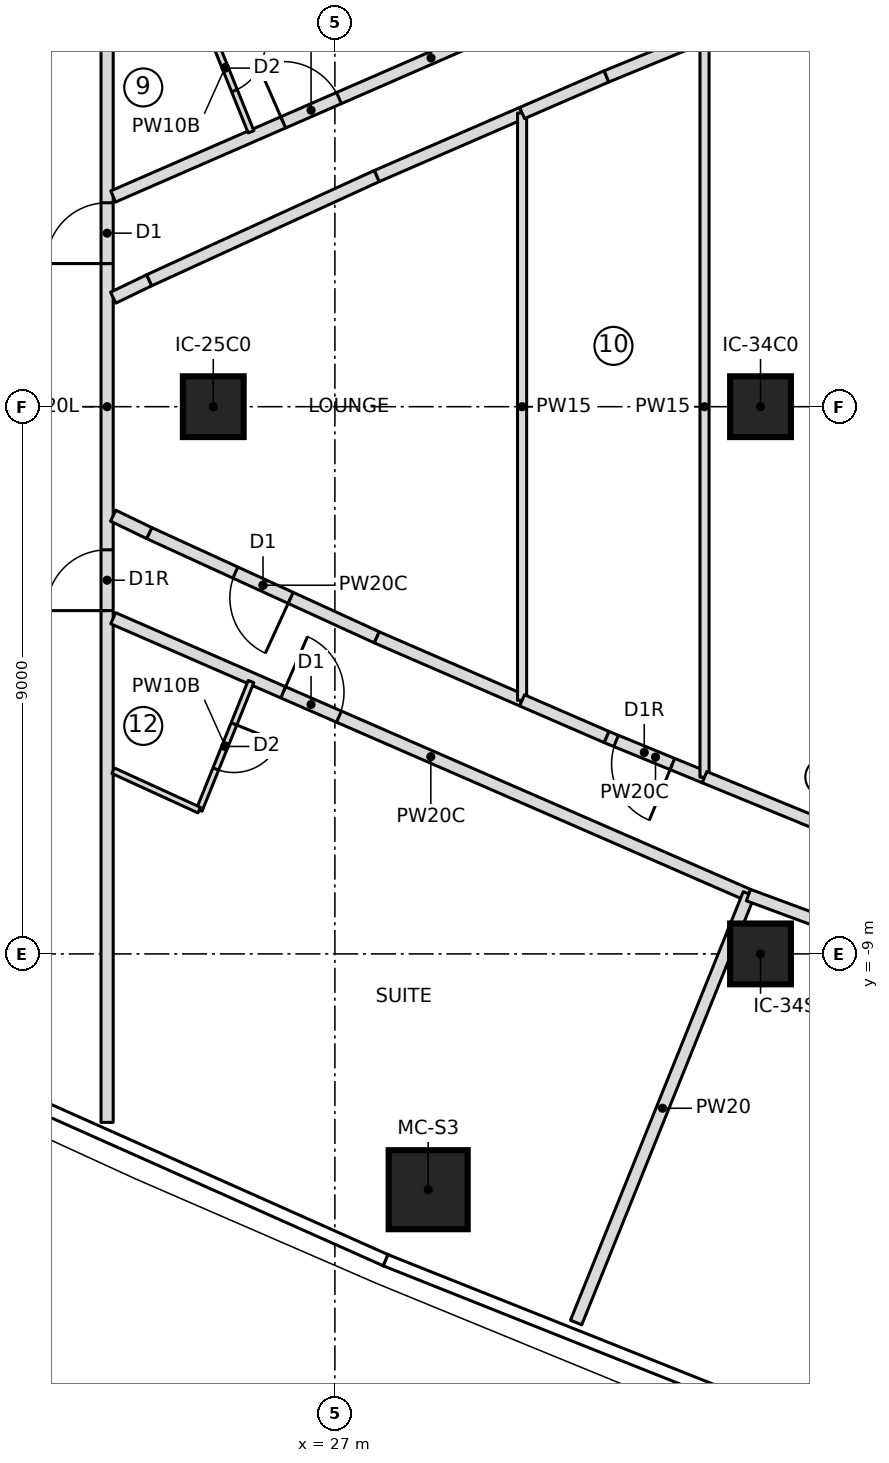
"""IFC4 building model, lengths in metres.
Left out: names, types, materials, properties, quantities, classifications, styles, units other than length and angle.
Written with IfcOpenShell. Run it as: python <this file> out.ifc"""

import sys

from ifc_helpers import new_model, si_unit, direction, frame, frame_2d, origin, origin_2d, place, context, subcontext, project, spatial, rectangle, extrude, element, fill, save


model = new_model("IFC4")
c1 = context("Model", 3, precision=1e-05, world=origin(), true_north=direction((0.0, 1.0)))
c2 = subcontext(c1, "Body", "Model", "MODEL_VIEW")
j1 = project(units=[si_unit("LENGTHUNIT", "METRE"), si_unit("PLANEANGLEUNIT", "RADIAN")], contexts=[c1])
p1 = place(None, origin())
s1 = spatial("IfcSite", under=j1, at=p1, CompositionType="ELEMENT")
p2 = place(p1, origin())
s2 = spatial("IfcBuilding", under=s1, at=p2, CompositionType="ELEMENT")
p3 = place(p2, frame((0.0, 0.0, 186.15)))
s3 = spatial("IfcBuildingStorey", under=s2, at=p3, CompositionType="ELEMENT", Elevation=186.15)
p4 = place(p3, frame((28.534, -12.878, 0.0), z_axis=(0.0, 0.0, 1.0), x_axis=(1.0, 0.0, 0.0)))
e1 = element("IfcColumn", 1, at=p4, inside=s3, PredefinedType="COLUMN", context=c2, shape_type="SweptSolid", body=[
    extrude(rectangle(XDim=1.3, YDim=1.3, at=origin_2d()), origin(), (0.0, 0.0, 1.0), 3.55),
])
for number, where, z_axis, x_axis in (
    (2, (25.0, 0.0, 0.0), (0.0, 0.0, 1.0), (1.0, 0.0, 0.0)),
    (3, (34.0, -9.0, 0.0), (0.0, 0.0, 1.0), (1.0, 0.0, 0.0)),
    (4, (34.0, 0.0, 0.0), (0.0, 0.0, 1.0), (1.0, 0.0, 0.0)),
):
    element("IfcColumn", number, at=place(p3, frame(where, z_axis=z_axis, x_axis=x_axis)), inside=s3, PredefinedType="COLUMN", context=c2, shape_type="SweptSolid", body=[
        extrude(rectangle(XDim=1.0, YDim=1.0, at=origin_2d()), origin(), (0.0, 0.0, 1.0), 3.55),
    ])
p5 = place(p3, frame((23.254, -11.771, 0.0), z_axis=(0.0, 0.0, 1.0), x_axis=(0.0, 1.0, 0.0)))
e5 = element("IfcWall", 5, at=p5, inside=s3, PredefinedType="PARTITIONING", context=c2, shape_type="SweptSolid", body=[
    extrude(rectangle(XDim=23.542, YDim=0.2, at=frame_2d((11.771, 0.0))), origin(), (0.0, 0.0, 1.0), 3.25),
])
p6 = place(p5, frame((14.125, 0.0, 0.0)))
e6 = element("IfcOpeningElement", 6, at=p6, cuts=e5, PredefinedType="OPENING", context=c2, shape_type="SweptSolid", body=[
    extrude(rectangle(XDim=1.0, YDim=2.1, at=frame_2d((0.5, 1.05))), frame((0.0, 0.11, 0.0), z_axis=(0.0, -1.0, 0.0), x_axis=(1.0, 0.0, 0.0)), (0.0, 0.0, 1.0), 0.22),
])
p7 = place(p5, frame((8.417, 0.0, 0.0)))
e7 = element("IfcOpeningElement", 7, at=p7, cuts=e5, PredefinedType="OPENING", context=c2, shape_type="SweptSolid", body=[
    extrude(rectangle(XDim=1.0, YDim=2.1, at=frame_2d((0.5, 1.05))), frame((0.0, 0.11, 0.0), z_axis=(0.0, -1.0, 0.0), x_axis=(1.0, 0.0, 0.0)), (0.0, 0.0, 1.0), 0.22),
])
p8 = place(p3, frame((23.354, 3.458, 0.0), z_axis=(0.0, 0.0, 1.0), x_axis=(0.916719487908, 0.399531451189, 0.0)))
e8 = element("IfcWall", 8, at=p8, inside=s3, PredefinedType="PARTITIONING", context=c2, shape_type="SweptSolid", body=[
    extrude(rectangle(XDim=11.404, YDim=0.2, at=frame_2d((5.702, 0.0))), origin(), (0.0, 0.0, 1.0), 3.25),
])
p9 = place(p8, frame((3.05, 0.0, 0.0)))
e9 = element("IfcOpeningElement", 9, at=p9, cuts=e8, PredefinedType="OPENING", context=c2, shape_type="SweptSolid", body=[
    extrude(rectangle(XDim=1.0, YDim=2.1, at=frame_2d((0.5, 1.05))), frame((0.0, 0.11, 0.0), z_axis=(0.0, -1.0, 0.0), x_axis=(1.0, 0.0, 0.0)), (0.0, 0.0, 1.0), 0.22),
])
p10 = place(p3, frame((24.769, 6.635, 0.0), z_axis=(0.0, 0.0, 1.0), x_axis=(0.373956446544, -0.927446265877, 0.0)))
e10 = element("IfcWall", 10, at=p10, inside=s3, PredefinedType="PARTITIONING", context=c2, shape_type="SweptSolid", body=[
    extrude(rectangle(XDim=2.279, YDim=0.1, at=frame_2d((1.14, 0.0))), origin(), (0.0, 0.0, 1.0), 3.25),
])
p11 = place(p10, frame((0.75, 0.0, 0.0)))
e11 = element("IfcOpeningElement", 11, at=p11, cuts=e10, PredefinedType="OPENING", context=c2, shape_type="SweptSolid", body=[
    extrude(rectangle(XDim=0.8, YDim=2.1, at=frame_2d((0.4, 1.05))), frame((0.0, 0.06, 0.0), z_axis=(0.0, -1.0, 0.0), x_axis=(1.0, 0.0, 0.0)), (0.0, 0.0, 1.0), 0.12),
])
p12 = place(p3, frame((23.354, -3.479, 0.0), z_axis=(0.0, 0.0, 1.0), x_axis=(0.916726746983, -0.399514794926, 0.0)))
e12 = element("IfcWall", 12, at=p12, inside=s3, PredefinedType="PARTITIONING", context=c2, shape_type="SweptSolid", body=[
    extrude(rectangle(XDim=11.396, YDim=0.2, at=frame_2d((5.698, 0.0))), origin(), (0.0, 0.0, 1.0), 3.25),
])
p13 = place(p12, frame((3.05, 0.0, 0.0)))
e13 = element("IfcOpeningElement", 13, at=p13, cuts=e12, PredefinedType="OPENING", context=c2, shape_type="SweptSolid", body=[
    extrude(rectangle(XDim=1.0, YDim=2.1, at=frame_2d((0.5, 1.05))), frame((0.0, 0.11, 0.0), z_axis=(0.0, -1.0, 0.0), x_axis=(1.0, 0.0, 0.0)), (0.0, 0.0, 1.0), 0.22),
])
p14 = place(p3, frame((25.621, -4.521, 0.0), z_axis=(0.0, 0.0, 1.0), x_axis=(-0.373956446544, -0.927446265877, 0.0)))
e14 = element("IfcWall", 14, at=p14, inside=s3, PredefinedType="PARTITIONING", context=c2, shape_type="SweptSolid", body=[
    extrude(rectangle(XDim=2.279, YDim=0.1, at=frame_2d((1.14, 0.0))), origin(), (0.0, 0.0, 1.0), 3.25),
])
p15 = place(p14, frame((0.75, 0.0, 0.0)))
e15 = element("IfcOpeningElement", 15, at=p15, cuts=e14, PredefinedType="OPENING", context=c2, shape_type="SweptSolid", body=[
    extrude(rectangle(XDim=0.8, YDim=2.1, at=frame_2d((0.4, 1.05))), frame((0.0, 0.06, 0.0), z_axis=(0.0, -1.0, 0.0), x_axis=(1.0, 0.0, 0.0)), (0.0, 0.0, 1.0), 0.12),
])
p16 = place(p3, frame((24.769, -6.635, 0.0), z_axis=(0.0, 0.0, 1.0), x_axis=(-0.909158902999, 0.416449383597, 0.0)))
e16 = element("IfcWall", 16, at=p16, inside=s3, PredefinedType="PARTITIONING", context=c2, shape_type="SweptSolid", body=[
    extrude(rectangle(XDim=1.556, YDim=0.1, at=frame_2d((0.778, 0.0))), origin(), (0.0, 0.0, 1.0), 3.25),
])
p17 = place(p3, frame((30.967, -15.063, 0.0), z_axis=(0.0, 0.0, 1.0), x_axis=(0.373887223455, 0.927474174378, 0.0)))
e17 = element("IfcWall", 17, at=p17, inside=s3, PredefinedType="PARTITIONING", context=c2, shape_type="SweptSolid", body=[
    extrude(rectangle(XDim=7.6, YDim=0.2, at=frame_2d((3.8, 0.0))), origin(), (0.0, 0.0, 1.0), 3.25),
])
p18 = place(p3, frame((33.801, -8.032, 0.0), z_axis=(0.0, 0.0, 1.0), x_axis=(0.937916242759, -0.346861819127, 0.0)))
e18 = element("IfcWall", 18, at=p18, inside=s3, PredefinedType="PARTITIONING", context=c2, shape_type="SweptSolid", body=[
    extrude(rectangle(XDim=11.405, YDim=0.2, at=frame_2d((5.702, 0.0))), origin(), (0.0, 0.0, 1.0), 3.25),
])
p19 = place(p18, frame((1.15, 0.0, 0.0)))
e19 = element("IfcOpeningElement", 19, at=p19, cuts=e18, PredefinedType="OPENING", context=c2, shape_type="SweptSolid", body=[
    extrude(rectangle(XDim=1.0, YDim=2.1, at=frame_2d((0.5, 1.05))), frame((0.0, 0.11, 0.0), z_axis=(0.0, -1.0, 0.0), x_axis=(1.0, 0.0, 0.0)), (0.0, 0.0, 1.0), 0.22),
])
p20 = place(p3, frame((27.69, -3.793, 0.0), z_axis=(0.0, 0.0, 1.0), x_axis=(-0.909180834404, 0.416401501382, 0.0)))
e20 = element("IfcWall", 20, at=p20, inside=s3, PredefinedType="PARTITIONING", context=c2, shape_type="SweptSolid", body=[
    extrude(rectangle(XDim=4.117, YDim=0.2, at=frame_2d((2.059, 0.0))), origin(), (0.0, 0.0, 1.0), 3.25),
])
p21 = place(p20, frame((1.559, 0.0, 0.0)))
e21 = element("IfcOpeningElement", 21, at=p21, cuts=e20, PredefinedType="OPENING", context=c2, shape_type="SweptSolid", body=[
    extrude(rectangle(XDim=1.0, YDim=2.1, at=frame_2d((0.5, 1.05))), frame((0.0, 0.11, 0.0), z_axis=(0.0, -1.0, 0.0), x_axis=(1.0, 0.0, 0.0)), (0.0, 0.0, 1.0), 0.22),
])
for number, where, z_axis, x_axis in (
    (22, (23.947, -2.079, 0.0), (0.0, 0.0, 1.0), (-0.901, 0.435, 0.0)),
    (23, (23.354, 1.793, 0.0), (0.0, 0.0, 1.0), (0.901, 0.435, 0.0)),
):
    element("IfcWall", number, at=place(p3, frame(where, z_axis=z_axis, x_axis=x_axis)), inside=s3, PredefinedType="PARTITIONING", context=c2, shape_type="SweptSolid", body=[
        extrude(rectangle(XDim=0.658, YDim=0.2, at=frame_2d((0.329, 0.0))), origin(), (0.0, 0.0, 1.0), 3.25),
    ])
p22 = place(p3, frame((23.947, 2.079, 0.0), z_axis=(0.0, 0.0, 1.0), x_axis=(0.909180834404, 0.416401501382, 0.0)))
e24 = element("IfcWall", 24, at=p22, inside=s3, PredefinedType="PARTITIONING", context=c2, shape_type="SweptSolid", body=[
    extrude(rectangle(XDim=4.117, YDim=0.2, at=frame_2d((2.059, 0.0))), origin(), (0.0, 0.0, 1.0), 3.25),
])
for number, where, z_axis, x_axis in (
    (25, (27.69, 3.793, 0.0), (0.0, 0.0, 1.0), (0.917, 0.398, 0.0)),
    (26, (30.079, -4.83, 0.0), (0.0, 0.0, 1.0), (-0.917, 0.398, 0.0)),
):
    element("IfcWall", number, at=place(p3, frame(where, z_axis=z_axis, x_axis=x_axis)), inside=s3, PredefinedType="PARTITIONING", context=c2, shape_type="SweptSolid", body=[
        extrude(rectangle(XDim=2.604, YDim=0.2, at=frame_2d((1.302, 0.0))), origin(), (0.0, 0.0, 1.0), 3.25),
    ])
p23 = place(p3, frame((30.079, -4.83, 0.0), z_axis=(0.0, 0.0, 1.0), x_axis=(0.0, 1.0, 0.0)))
e27 = element("IfcWall", 27, at=p23, inside=s3, PredefinedType="PARTITIONING", context=c2, shape_type="SweptSolid", body=[
    extrude(rectangle(XDim=9.66, YDim=0.15, at=frame_2d((4.83, 0.0))), origin(), (0.0, 0.0, 1.0), 3.25),
])
p24 = place(p3, frame((33.079, -6.093, 0.0), z_axis=(0.0, 0.0, 1.0), x_axis=(-0.925234201035, 0.379396459177, 0.0)))
e28 = element("IfcWall", 28, at=p24, inside=s3, PredefinedType="PARTITIONING", context=c2, shape_type="SweptSolid", body=[
    extrude(rectangle(XDim=1.743, YDim=0.2, at=frame_2d((0.871, 0.0))), origin(), (0.0, 0.0, 1.0), 3.25),
])
p25 = place(p24, frame((0.571, 0.0, 0.0)))
e29 = element("IfcOpeningElement", 29, at=p25, cuts=e28, PredefinedType="OPENING", context=c2, shape_type="SweptSolid", body=[
    extrude(rectangle(XDim=1.0, YDim=2.1, at=frame_2d((0.5, 1.05))), frame((0.0, 0.11, 0.0), z_axis=(0.0, -1.0, 0.0), x_axis=(1.0, 0.0, 0.0)), (0.0, 0.0, 1.0), 0.22),
])
for number, where, z_axis, x_axis in (
    (30, (31.467, -5.432, 0.0), (0.0, 0.0, 1.0), (-0.917, 0.398, 0.0)),
    (31, (30.079, 4.83, 0.0), (0.0, 0.0, 1.0), (0.917, 0.398, 0.0)),
):
    element("IfcWall", number, at=place(p3, frame(where, z_axis=z_axis, x_axis=x_axis)), inside=s3, PredefinedType="PARTITIONING", context=c2, shape_type="SweptSolid", body=[
        extrude(rectangle(XDim=1.513, YDim=0.2, at=frame_2d((0.756, 0.0))), origin(), (0.0, 0.0, 1.0), 3.25),
    ])
p26 = place(p3, frame((31.467, 5.432, 0.0), z_axis=(0.0, 0.0, 1.0), x_axis=(0.925234201035, 0.379396459177, 0.0)))
e32 = element("IfcWall", 32, at=p26, inside=s3, PredefinedType="PARTITIONING", context=c2, shape_type="SweptSolid", body=[
    extrude(rectangle(XDim=1.743, YDim=0.2, at=frame_2d((0.871, 0.0))), origin(), (0.0, 0.0, 1.0), 3.25),
])
p27 = place(p3, frame((33.079, -6.093, 0.0), z_axis=(0.0, 0.0, 1.0), x_axis=(0.0, 1.0, 0.0)))
e33 = element("IfcWall", 33, at=p27, inside=s3, PredefinedType="PARTITIONING", context=c2, shape_type="SweptSolid", body=[
    extrude(rectangle(XDim=12.187, YDim=0.15, at=frame_2d((6.093, 0.0))), origin(), (0.0, 0.0, 1.0), 3.25),
])
p28 = place(p3, frame((35.276, -6.994, 0.0), z_axis=(0.0, 0.0, 1.0), x_axis=(-0.925186207522, 0.37951347988, 0.0)))
e34 = element("IfcWall", 34, at=p28, inside=s3, PredefinedType="PARTITIONING", context=c2, shape_type="SweptSolid", body=[
    extrude(rectangle(XDim=2.375, YDim=0.2, at=frame_2d((1.187, 0.0))), origin(), (0.0, 0.0, 1.0), 3.25),
])
p29 = place(p6, origin())
e35 = element("IfcDoor", 35, at=p29, inside=s3, OperationType="SINGLE_SWING_LEFT", PredefinedType="DOOR", context=c2, shape_type="SweptSolid", body=[
    extrude(rectangle(XDim=1.0, YDim=2.1, at=frame_2d((0.5, 1.05))), frame((0.0, 0.025, 0.0), z_axis=(0.0, -1.0, 0.0), x_axis=(1.0, 0.0, 0.0)), (0.0, 0.0, 1.0), 0.05),
])
fill(e6, e35)
p30 = place(p7, origin())
e36 = element("IfcDoor", 36, at=p30, inside=s3, OperationType="SINGLE_SWING_RIGHT", PredefinedType="DOOR", context=c2, shape_type="SweptSolid", body=[
    extrude(rectangle(XDim=1.0, YDim=2.1, at=frame_2d((0.5, 1.05))), frame((0.0, 0.025, 0.0), z_axis=(0.0, -1.0, 0.0), x_axis=(1.0, 0.0, 0.0)), (0.0, 0.0, 1.0), 0.05),
])
fill(e7, e36)
p31 = place(p11, origin())
e37 = element("IfcDoor", 37, at=p31, inside=s3, OperationType="SINGLE_SWING_LEFT", PredefinedType="DOOR", context=c2, shape_type="SweptSolid", body=[
    extrude(rectangle(XDim=0.8, YDim=2.1, at=frame_2d((0.4, 1.05))), frame((0.0, 0.025, 0.0), z_axis=(0.0, -1.0, 0.0), x_axis=(1.0, 0.0, 0.0)), (0.0, 0.0, 1.0), 0.05),
])
fill(e11, e37)
p32 = place(p9, origin())
e38 = element("IfcDoor", 38, at=p32, inside=s3, OperationType="SINGLE_SWING_RIGHT", PredefinedType="DOOR", context=c2, shape_type="SweptSolid", body=[
    extrude(rectangle(XDim=1.0, YDim=2.1, at=frame_2d((0.5, 1.05))), frame((0.0, 0.025, 0.0), z_axis=(0.0, -1.0, 0.0), x_axis=(1.0, 0.0, 0.0)), (0.0, 0.0, 1.0), 0.05),
])
fill(e9, e38)
p33 = place(p15, origin())
e39 = element("IfcDoor", 39, at=p33, inside=s3, OperationType="SINGLE_SWING_LEFT", PredefinedType="DOOR", context=c2, shape_type="SweptSolid", body=[
    extrude(rectangle(XDim=0.8, YDim=2.1, at=frame_2d((0.4, 1.05))), frame((0.0, 0.025, 0.0), z_axis=(0.0, -1.0, 0.0), x_axis=(1.0, 0.0, 0.0)), (0.0, 0.0, 1.0), 0.05),
])
fill(e15, e39)
p34 = place(p13, origin())
e40 = element("IfcDoor", 40, at=p34, inside=s3, OperationType="SINGLE_SWING_LEFT", PredefinedType="DOOR", context=c2, shape_type="SweptSolid", body=[
    extrude(rectangle(XDim=1.0, YDim=2.1, at=frame_2d((0.5, 1.05))), frame((0.0, 0.025, 0.0), z_axis=(0.0, -1.0, 0.0), x_axis=(1.0, 0.0, 0.0)), (0.0, 0.0, 1.0), 0.05),
])
fill(e13, e40)
p35 = place(p21, origin())
e41 = element("IfcDoor", 41, at=p35, inside=s3, OperationType="SINGLE_SWING_LEFT", PredefinedType="DOOR", context=c2, shape_type="SweptSolid", body=[
    extrude(rectangle(XDim=1.0, YDim=2.1, at=frame_2d((0.5, 1.05))), frame((0.0, 0.025, 0.0), z_axis=(0.0, -1.0, 0.0), x_axis=(1.0, 0.0, 0.0)), (0.0, 0.0, 1.0), 0.05),
])
fill(e21, e41)
p36 = place(p25, origin())
e42 = element("IfcDoor", 42, at=p36, inside=s3, OperationType="SINGLE_SWING_RIGHT", PredefinedType="DOOR", context=c2, shape_type="SweptSolid", body=[
    extrude(rectangle(XDim=1.0, YDim=2.1, at=frame_2d((0.5, 1.05))), frame((0.0, 0.025, 0.0), z_axis=(0.0, -1.0, 0.0), x_axis=(1.0, 0.0, 0.0)), (0.0, 0.0, 1.0), 0.05),
])
fill(e29, e42)
save(model, sys.argv[1])
